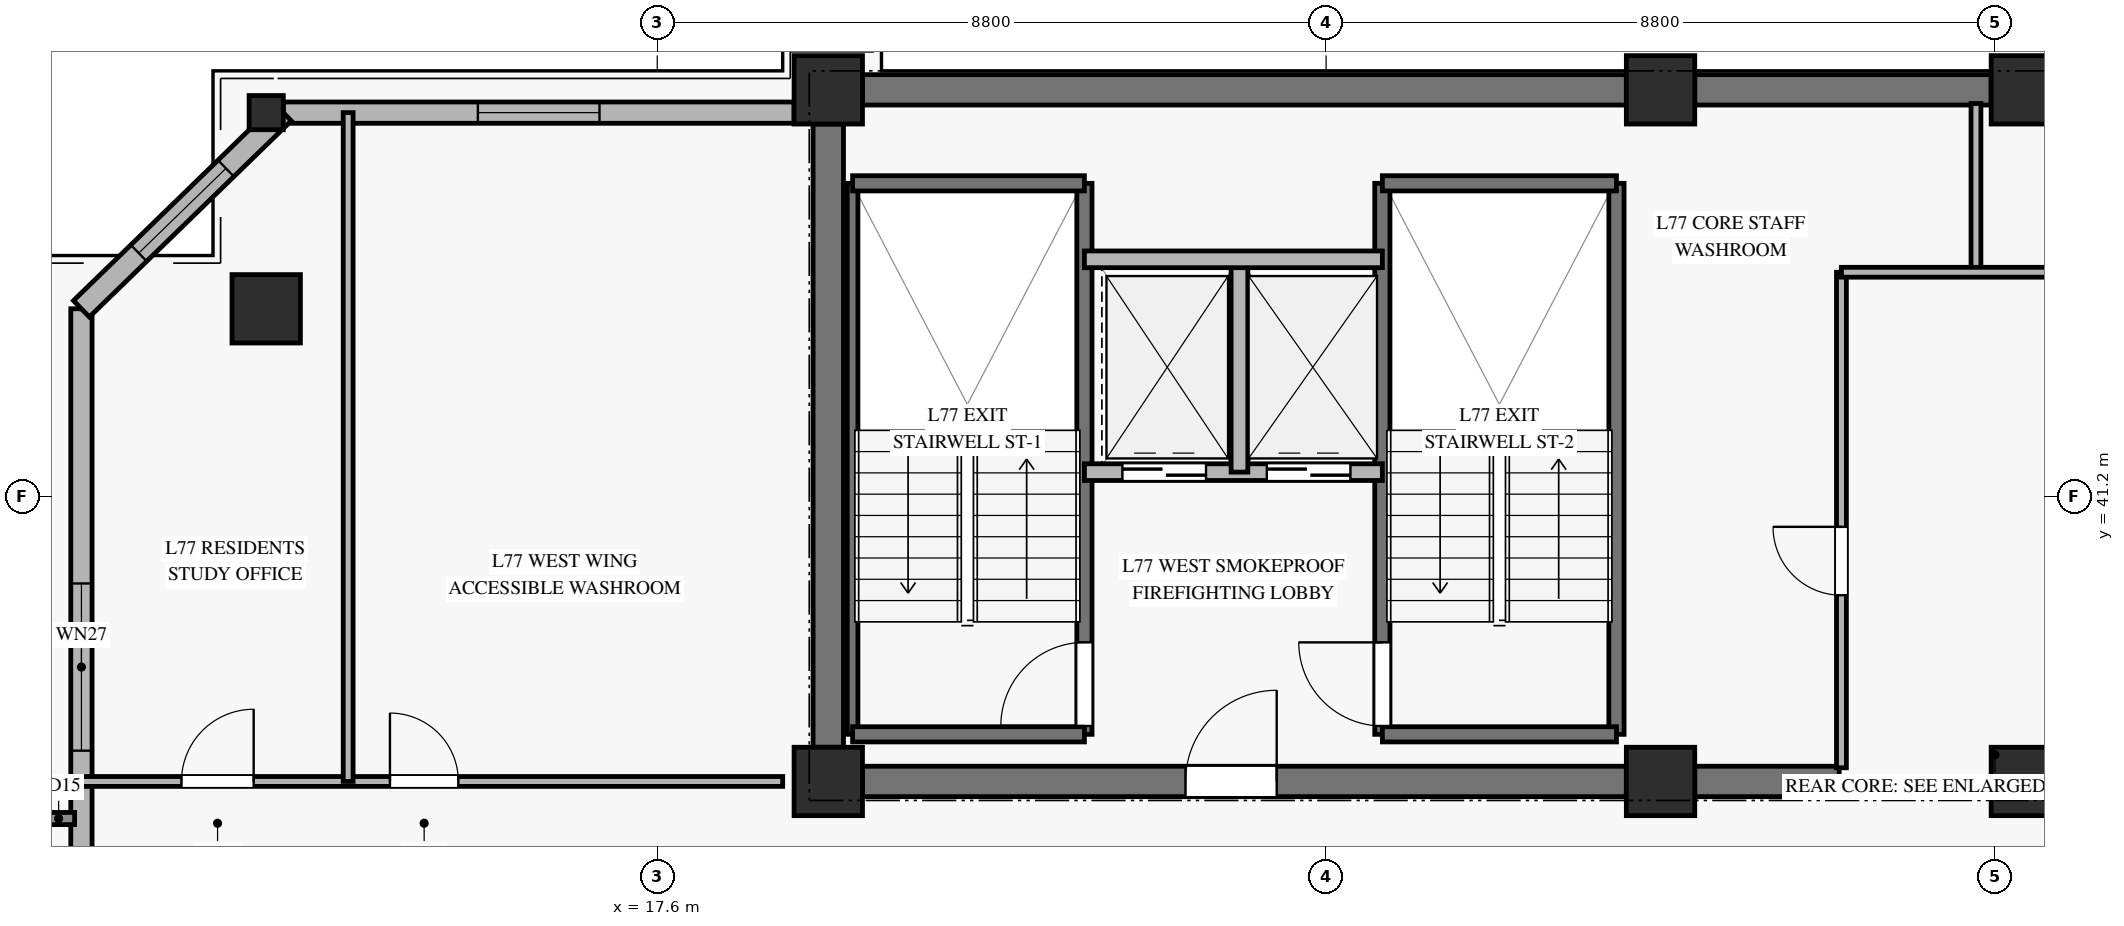
"""IFC4 building model, lengths in metres.
Left out: names, types, materials, properties, quantities, classifications, styles, units other than length and angle.
Written with IfcOpenShell. Run it as: python <this file> out.ifc"""

import sys

from ifc_helpers import new_model, si_unit, direction, frame, frame_2d, origin, origin_2d, place, context, subcontext, project, spatial, rectangle, hollow_rectangle, extrude, source, transform, mapped, element, fill, save


model = new_model("IFC4")
c1 = context("Model", 3, precision=1e-05, world=origin(), true_north=direction((0.0, 1.0)))
c2 = subcontext(c1, "Body", "Model", "MODEL_VIEW")
j1 = project(units=[si_unit("LENGTHUNIT", "METRE"), si_unit("PLANEANGLEUNIT", "RADIAN")], contexts=[c1])
p1 = place(None, origin())
s1 = spatial("IfcSite", under=j1, at=p1, CompositionType="ELEMENT")
p2 = place(p1, origin())
s2 = spatial("IfcBuilding", under=s1, at=p2, CompositionType="ELEMENT")
p3 = place(p2, frame((0.0, 0.0, 300.6)))
s3 = spatial("IfcBuildingStorey", under=s2, at=p3, CompositionType="ELEMENT", Elevation=300.6)
m1 = source(origin(), c2, "Body", "SweptSolid", [
    extrude(rectangle(XDim=0.9, YDim=0.9, at=origin_2d()), origin(), (0.0, 0.0, 1.0), 3.185),
])
for number, where, z_axis, x_axis in (
    (1, (19.85, 37.45, 0.0), (0.0, 0.0, 1.0), (1.0, 0.0, 0.0)),
    (2, (19.85, 46.55, 0.0), (0.0, 0.0, 1.0), (1.0, 0.0, 0.0)),
    (3, (30.8, 37.45, 0.0), (0.0, 0.0, 1.0), (1.0, 0.0, 0.0)),
    (4, (30.8, 46.55, 0.0), (0.0, 0.0, 1.0), (1.0, 0.0, 0.0)),
    (5, (35.6, 37.45, 0.0), (0.0, 0.0, 1.0), (1.0, 0.0, 0.0)),
    (6, (35.6, 46.55, 0.0), (0.0, 0.0, 1.0), (1.0, 0.0, 0.0)),
):
    element("IfcColumn", number, at=place(p3, frame(where, z_axis=z_axis, x_axis=x_axis)), inside=s3, PredefinedType="PILASTER", context=c2, shape_type="MappedRepresentation", body=[
        mapped(m1, transform((0.0, 0.0, 0.0), x_axis=(1.0, 0.0, 0.0), y_axis=(0.0, 1.0, 0.0), z_axis=(0.0, 0.0, 1.0), scale=1.0)),
    ])
p4 = place(p3, frame((20.3, 46.55, 0.0), z_axis=(0.0, 0.0, 1.0), x_axis=(1.0, 0.0, 0.0)))
e7 = element("IfcWall", 7, at=p4, inside=s3, PredefinedType="SHEAR", context=c2, shape_type="SweptSolid", body=[
    extrude(rectangle(XDim=10.05, YDim=0.4, at=frame_2d((5.025, 0.0))), origin(), (0.0, 0.0, 1.0), 3.185),
])
p5 = place(p3, frame((31.25, 46.55, 0.0), z_axis=(0.0, 0.0, 1.0), x_axis=(1.0, 0.0, 0.0)))
e8 = element("IfcWall", 8, at=p5, inside=s3, PredefinedType="SHEAR", context=c2, shape_type="SweptSolid", body=[
    extrude(rectangle(XDim=3.9, YDim=0.4, at=frame_2d((1.95, 0.0))), origin(), (0.0, 0.0, 1.0), 3.185),
])
p6 = place(p3, frame((20.3, 37.45, 0.0), z_axis=(0.0, 0.0, 1.0), x_axis=(1.0, 0.0, 0.0)))
e9 = element("IfcWall", 9, at=p6, inside=s3, PredefinedType="SHEAR", context=c2, shape_type="SweptSolid", body=[
    extrude(rectangle(XDim=10.05, YDim=0.4, at=frame_2d((5.025, 0.0))), origin(), (0.0, 0.0, 1.0), 3.185),
])
p7 = place(p6, frame((4.25, 0.0, 0.0)))
e10 = element("IfcOpeningElement", 10, at=p7, cuts=e9, PredefinedType="OPENING", context=c2, shape_type="SweptSolid", body=[
    extrude(rectangle(XDim=1.2, YDim=2.15, at=frame_2d((0.6, 1.075))), frame((0.0, 0.21, 0.0), z_axis=(0.0, -1.0, 0.0), x_axis=(1.0, 0.0, 0.0)), (0.0, 0.0, 1.0), 0.42),
])
p8 = place(p3, frame((31.25, 37.45, 0.0), z_axis=(0.0, 0.0, 1.0), x_axis=(1.0, 0.0, 0.0)))
e11 = element("IfcWall", 11, at=p8, inside=s3, PredefinedType="SHEAR", context=c2, shape_type="SweptSolid", body=[
    extrude(rectangle(XDim=1.9, YDim=0.4, at=frame_2d((0.95, 0.0))), origin(), (0.0, 0.0, 1.0), 3.185),
])
p9 = place(p3, frame((19.85, 37.9, 0.0), z_axis=(0.0, 0.0, 1.0), x_axis=(0.0, 1.0, 0.0)))
e12 = element("IfcWall", 12, at=p9, inside=s3, PredefinedType="SHEAR", context=c2, shape_type="SweptSolid", body=[
    extrude(rectangle(XDim=8.2, YDim=0.4, at=frame_2d((4.1, 0.0))), origin(), (0.0, 0.0, 1.0), 3.185),
])
m2 = source(origin(), c2, "Body", "SweptSolid", [
    extrude(hollow_rectangle(XDim=0.9, YDim=0.9, WallThickness=0.04, at=origin_2d()), origin(), (0.0, 0.0, 1.0), 3.207),
])
p10 = place(p3, frame((12.455, 43.669, 0.0), z_axis=(0.11534913529, 0.014390090145, 0.993220772182), x_axis=(-0.123792888876, 0.992308077496, 0.0)))
e13 = element("IfcColumn", 13, at=p10, inside=s3, PredefinedType="COLUMN", context=c2, shape_type="MappedRepresentation", body=[
    mapped(m2, transform((0.0, 0.0, 0.0), x_axis=(1.0, 0.0, 0.0), y_axis=(0.0, 1.0, 0.0), z_axis=(0.0, 0.0, 1.0), scale=1.0)),
])
m3 = source(origin(), c2, "Body", "SweptSolid", [
    extrude(hollow_rectangle(XDim=0.45, YDim=0.45, WallThickness=0.022, at=origin_2d()), origin(), (0.0, 0.0, 1.0), 3.206),
])
p11 = place(p3, frame((12.455, 46.25, 0.0), z_axis=(0.115361080088, 0.0, 0.993323623599), x_axis=(0.0, 1.0, 0.0)))
e14 = element("IfcColumn", 14, at=p11, inside=s3, PredefinedType="COLUMN", context=c2, shape_type="MappedRepresentation", body=[
    mapped(m3, transform((0.0, 0.0, 0.0), x_axis=(1.0, 0.0, 0.0), y_axis=(0.0, 1.0, 0.0), z_axis=(0.0, 0.0, 1.0), scale=1.0)),
])
p12 = place(p3, frame((10.024, 32.696, 0.0), z_axis=(0.0, 0.0, 1.0), x_axis=(0.0, 1.0, 0.0)))
e15 = element("IfcWall", 15, at=p12, inside=s3, PredefinedType="SOLIDWALL", context=c2, shape_type="SweptSolid", body=[
    extrude(rectangle(XDim=10.973, YDim=0.28, at=frame_2d((5.486, 0.0))), origin(), (0.0, 0.0, 1.0), 2.815),
])
p13 = place(p12, frame((5.159, 0.0, 0.45)))
e16 = element("IfcOpeningElement", 16, at=p13, cuts=e15, PredefinedType="OPENING", context=c2, shape_type="SweptSolid", body=[
    extrude(rectangle(XDim=2.2, YDim=2.1, at=frame_2d((1.1, 1.05))), frame((0.0, 0.15, 0.0), z_axis=(0.0, -1.0, 0.0), x_axis=(1.0, 0.0, 0.0)), (0.0, 0.0, 1.0), 0.3),
])
p14 = place(p3, frame((12.68, 46.25, 0.0), z_axis=(0.0, 0.0, 1.0), x_axis=(1.0, 0.0, 0.0)))
e17 = element("IfcWall", 17, at=p14, inside=s3, PredefinedType="SOLIDWALL", context=c2, shape_type="SweptSolid", body=[
    extrude(rectangle(XDim=6.72, YDim=0.28, at=frame_2d((3.36, 0.0))), origin(), (0.0, 0.0, 1.0), 2.815),
])
p15 = place(p14, frame((2.56, 0.0, 0.45)))
e18 = element("IfcOpeningElement", 18, at=p15, cuts=e17, PredefinedType="OPENING", context=c2, shape_type="SweptSolid", body=[
    extrude(rectangle(XDim=1.6, YDim=2.0, at=frame_2d((0.8, 1.0))), frame((0.0, 0.15, 0.0), z_axis=(0.0, -1.0, 0.0), x_axis=(1.0, 0.0, 0.0)), (0.0, 0.0, 1.0), 0.3),
])
p16 = place(p3, frame((12.68, 46.25, 0.0), z_axis=(0.0, 0.0, 1.0), x_axis=(-0.717153230711, -0.696915521194, 0.0)))
e19 = element("IfcWall", 19, at=p16, inside=s3, PredefinedType="SOLIDWALL", context=c2, shape_type="SweptSolid", body=[
    extrude(rectangle(XDim=3.704, YDim=0.3, at=frame_2d((1.852, 0.0))), origin(), (0.0, 0.0, 1.0), 2.815),
])
p17 = place(p16, frame((1.052, 0.0, 0.45)))
e20 = element("IfcOpeningElement", 20, at=p17, cuts=e19, PredefinedType="OPENING", context=c2, shape_type="SweptSolid", body=[
    extrude(rectangle(XDim=1.6, YDim=2.0, at=frame_2d((0.8, 1.0))), frame((0.0, 0.16, 0.0), z_axis=(0.0, -1.0, 0.0), x_axis=(1.0, 0.0, 0.0)), (0.0, 0.0, 1.0), 0.32),
])
p18 = place(p3, frame((20.17, 38.07, 0.0), z_axis=(0.0, 0.0, 1.0), x_axis=(0.0, 1.0, 0.0)))
e21 = element("IfcWall", 21, at=p18, inside=s3, PredefinedType="SOLIDWALL", context=c2, shape_type="SweptSolid", body=[
    extrude(rectangle(XDim=7.25, YDim=0.14, at=frame_2d((3.625, 0.0))), origin(), (0.0, 0.0, 1.0), 3.4),
])
p19 = place(p3, frame((23.22, 38.07, 0.0), z_axis=(0.0, 0.0, 1.0), x_axis=(0.0, 1.0, 0.0)))
e22 = element("IfcWall", 22, at=p19, inside=s3, PredefinedType="SOLIDWALL", context=c2, shape_type="SweptSolid", body=[
    extrude(rectangle(XDim=7.25, YDim=0.2, at=frame_2d((3.625, 0.0))), origin(), (0.0, 0.0, 1.0), 3.4),
])
p20 = place(p19, frame((0.11, 0.0, 0.0)))
e23 = element("IfcOpeningElement", 23, at=p20, cuts=e22, PredefinedType="OPENING", context=c2, shape_type="SweptSolid", body=[
    extrude(rectangle(XDim=1.1, YDim=2.15, at=frame_2d((0.55, 1.075))), frame((0.0, 0.11, 0.0), z_axis=(0.0, -1.0, 0.0), x_axis=(1.0, 0.0, 0.0)), (0.0, 0.0, 1.0), 0.22),
])
for number, where, z_axis, x_axis in (
    (24, (20.17, 45.32, 0.0), (0.0, 0.0, 1.0), (1.0, 0.0, 0.0)),
    (25, (20.17, 38.07, 0.0), (0.0, 0.0, 1.0), (1.0, 0.0, 0.0)),
):
    element("IfcWall", number, at=place(p3, frame(where, z_axis=z_axis, x_axis=x_axis)), inside=s3, PredefinedType="SOLIDWALL", context=c2, shape_type="SweptSolid", body=[
        extrude(rectangle(XDim=3.05, YDim=0.2, at=frame_2d((1.525, 0.0))), origin(), (0.0, 0.0, 1.0), 3.4),
    ])
p21 = place(p3, frame((27.14, 38.07, 0.0), z_axis=(0.0, 0.0, 1.0), x_axis=(0.0, 1.0, 0.0)))
e26 = element("IfcWall", 26, at=p21, inside=s3, PredefinedType="SOLIDWALL", context=c2, shape_type="SweptSolid", body=[
    extrude(rectangle(XDim=7.25, YDim=0.2, at=frame_2d((3.625, 0.0))), origin(), (0.0, 0.0, 1.0), 3.4),
])
p22 = place(p21, frame((0.11, 0.0, 0.0)))
e27 = element("IfcOpeningElement", 27, at=p22, cuts=e26, PredefinedType="OPENING", context=c2, shape_type="SweptSolid", body=[
    extrude(rectangle(XDim=1.1, YDim=2.15, at=frame_2d((0.55, 1.075))), frame((0.0, 0.11, 0.0), z_axis=(0.0, -1.0, 0.0), x_axis=(1.0, 0.0, 0.0)), (0.0, 0.0, 1.0), 0.22),
])
p23 = place(p3, frame((30.22, 38.07, 0.0), z_axis=(0.0, 0.0, 1.0), x_axis=(0.0, 1.0, 0.0)))
e28 = element("IfcWall", 28, at=p23, inside=s3, PredefinedType="SOLIDWALL", context=c2, shape_type="SweptSolid", body=[
    extrude(rectangle(XDim=7.25, YDim=0.2, at=frame_2d((3.625, 0.0))), origin(), (0.0, 0.0, 1.0), 3.4),
])
for number, where, z_axis, x_axis in (
    (29, (27.14, 45.32, 0.0), (0.0, 0.0, 1.0), (1.0, 0.0, 0.0)),
    (30, (27.14, 38.07, 0.0), (0.0, 0.0, 1.0), (1.0, 0.0, 0.0)),
):
    element("IfcWall", number, at=place(p3, frame(where, z_axis=z_axis, x_axis=x_axis)), inside=s3, PredefinedType="SOLIDWALL", context=c2, shape_type="SweptSolid", body=[
        extrude(rectangle(XDim=3.08, YDim=0.2, at=frame_2d((1.54, 0.0))), origin(), (0.0, 0.0, 1.0), 3.4),
    ])
p24 = place(p3, frame((23.22, 41.52, 0.0), z_axis=(0.0, 0.0, 1.0), x_axis=(1.0, 0.0, 0.0)))
e31 = element("IfcWall", 31, at=p24, inside=s3, PredefinedType="SOLIDWALL", context=c2, shape_type="SweptSolid", body=[
    extrude(rectangle(XDim=3.92, YDim=0.22, at=frame_2d((1.96, 0.0))), origin(), (0.0, 0.0, 1.0), 3.185),
])
p25 = place(p24, frame((0.5, 0.0, 0.0)))
e32 = element("IfcOpeningElement", 32, at=p25, cuts=e31, PredefinedType="OPENING", context=c2, shape_type="SweptSolid", body=[
    extrude(rectangle(XDim=1.1, YDim=2.2, at=frame_2d((0.55, 1.1))), frame((0.0, 0.12, 0.0), z_axis=(0.0, -1.0, 0.0), x_axis=(1.0, 0.0, 0.0)), (0.0, 0.0, 1.0), 0.24),
])
p26 = place(p24, frame((2.4, 0.0, 0.0)))
e33 = element("IfcOpeningElement", 33, at=p26, cuts=e31, PredefinedType="OPENING", context=c2, shape_type="SweptSolid", body=[
    extrude(rectangle(XDim=1.1, YDim=2.2, at=frame_2d((0.55, 1.1))), frame((0.0, 0.12, 0.0), z_axis=(0.0, -1.0, 0.0), x_axis=(1.0, 0.0, 0.0)), (0.0, 0.0, 1.0), 0.24),
])
p27 = place(p3, frame((25.26, 41.52, 0.0), z_axis=(0.0, 0.0, 1.0), x_axis=(0.0, 1.0, 0.0)))
e34 = element("IfcWall", 34, at=p27, inside=s3, PredefinedType="SOLIDWALL", context=c2, shape_type="SweptSolid", body=[
    extrude(rectangle(XDim=2.8, YDim=0.22, at=frame_2d((1.4, 0.0))), origin(), (0.0, 0.0, 1.0), 3.185),
])
p28 = place(p3, frame((23.22, 44.32, 0.0), z_axis=(0.0, 0.0, 1.0), x_axis=(1.0, 0.0, 0.0)))
e35 = element("IfcWall", 35, at=p28, inside=s3, PredefinedType="SOLIDWALL", context=c2, shape_type="SweptSolid", body=[
    extrude(rectangle(XDim=3.92, YDim=0.22, at=frame_2d((1.96, 0.0))), origin(), (0.0, 0.0, 1.0), 3.185),
])
p29 = place(p3, frame((33.18, 37.63, 0.0), z_axis=(0.0, 0.0, 1.0), x_axis=(0.0, 1.0, 0.0)))
e36 = element("IfcWall", 36, at=p29, inside=s3, PredefinedType="PARTITIONING", context=c2, shape_type="SweptSolid", body=[
    extrude(rectangle(XDim=6.52, YDim=0.13, at=frame_2d((3.26, 0.0))), origin(), (0.0, 0.0, 1.0), 2.27),
])
p30 = place(p29, frame((2.27, 0.0, 0.0)))
e37 = element("IfcOpeningElement", 37, at=p30, cuts=e36, PredefinedType="OPENING", context=c2, shape_type="SweptSolid", body=[
    extrude(rectangle(XDim=0.9, YDim=2.1, at=frame_2d((0.45, 1.05))), frame((0.0, 0.075, 0.0), z_axis=(0.0, -1.0, 0.0), x_axis=(1.0, 0.0, 0.0)), (0.0, 0.0, 1.0), 0.15),
])
p31 = place(p3, frame((34.95, 44.15, 0.0), z_axis=(0.0, 0.0, 1.0), x_axis=(0.0, 1.0, 0.0)))
e38 = element("IfcWall", 38, at=p31, inside=s3, PredefinedType="PARTITIONING", context=c2, shape_type="SweptSolid", body=[
    extrude(rectangle(XDim=2.22, YDim=0.13, at=frame_2d((1.11, 0.0))), origin(), (0.0, 0.0, 1.0), 3.185),
])
p32 = place(p3, frame((33.18, 44.15, 0.0), z_axis=(0.0, 0.0, 1.0), x_axis=(1.0, 0.0, 0.0)))
e39 = element("IfcWall", 39, at=p32, inside=s3, PredefinedType="PARTITIONING", context=c2, shape_type="SweptSolid", body=[
    extrude(rectangle(XDim=2.94, YDim=0.13, at=frame_2d((1.47, 0.0))), origin(), (0.0, 0.0, 1.0), 2.47),
])
p33 = place(p3, frame((10.024, 37.45, 0.0), z_axis=(0.0, 0.0, 1.0), x_axis=(1.0, 0.0, 0.0)))
e40 = element("IfcWall", 40, at=p33, inside=s3, PredefinedType="PARTITIONING", context=c2, shape_type="SweptSolid", body=[
    extrude(rectangle(XDim=9.226, YDim=0.13, at=frame_2d((4.613, 0.0))), origin(), (0.0, 0.0, 1.0), 2.82),
])
p34 = place(p33, frame((1.316, 0.0, 0.0)))
e41 = element("IfcOpeningElement", 41, at=p34, cuts=e40, PredefinedType="OPENING", context=c2, shape_type="SweptSolid", body=[
    extrude(rectangle(XDim=0.95, YDim=2.1, at=frame_2d((0.475, 1.05))), frame((0.0, 0.075, 0.0), z_axis=(0.0, -1.0, 0.0), x_axis=(1.0, 0.0, 0.0)), (0.0, 0.0, 1.0), 0.15),
])
p35 = place(p33, frame((4.059, 0.0, 0.0)))
e42 = element("IfcOpeningElement", 42, at=p35, cuts=e40, PredefinedType="OPENING", context=c2, shape_type="SweptSolid", body=[
    extrude(rectangle(XDim=0.9, YDim=2.1, at=frame_2d((0.45, 1.05))), frame((0.0, 0.075, 0.0), z_axis=(0.0, -1.0, 0.0), x_axis=(1.0, 0.0, 0.0)), (0.0, 0.0, 1.0), 0.15),
])
p36 = place(p3, frame((13.533, 37.45, 0.0), z_axis=(0.0, 0.0, 1.0), x_axis=(0.0, 1.0, 0.0)))
e43 = element("IfcWall", 43, at=p36, inside=s3, PredefinedType="PARTITIONING", context=c2, shape_type="SweptSolid", body=[
    extrude(rectangle(XDim=8.8, YDim=0.13, at=frame_2d((4.4, 0.0))), origin(), (0.0, 0.0, 1.0), 3.185),
])
m4 = source(origin(), c2, "Body", "SweptSolid", [
    extrude(rectangle(XDim=2.2, YDim=2.1, at=frame_2d((1.1, 1.05))), frame((0.0, 0.03, 0.0), z_axis=(0.0, -1.0, 0.0), x_axis=(1.0, 0.0, 0.0)), (0.0, 0.0, 1.0), 0.06),
])
p37 = place(p13, origin())
e44 = element("IfcWindow", 44, at=p37, inside=s3, PartitioningType="SINGLE_PANEL", PredefinedType="WINDOW", context=c2, shape_type="MappedRepresentation", body=[
    mapped(m4, transform((0.0, 0.0, 0.0), x_axis=(1.0, 0.0, 0.0), y_axis=(0.0, 1.0, 0.0), z_axis=(0.0, 0.0, 1.0), scale=1.0)),
])
fill(e16, e44)
m5 = source(origin(), c2, "Body", "SweptSolid", [
    extrude(rectangle(XDim=1.6, YDim=2.0, at=frame_2d((0.8, 1.0))), frame((0.0, 0.03, 0.0), z_axis=(0.0, -1.0, 0.0), x_axis=(1.0, 0.0, 0.0)), (0.0, 0.0, 1.0), 0.06),
])
p38 = place(p15, origin())
e45 = element("IfcWindow", 45, at=p38, inside=s3, PartitioningType="SINGLE_PANEL", PredefinedType="WINDOW", context=c2, shape_type="MappedRepresentation", body=[
    mapped(m5, transform((0.0, 0.0, 0.0), x_axis=(1.0, 0.0, 0.0), y_axis=(0.0, 1.0, 0.0), z_axis=(0.0, 0.0, 1.0), scale=1.0)),
])
fill(e18, e45)
p39 = place(p17, origin())
e46 = element("IfcWindow", 46, at=p39, inside=s3, PartitioningType="SINGLE_PANEL", PredefinedType="WINDOW", context=c2, shape_type="MappedRepresentation", body=[
    mapped(m5, transform((0.0, 0.0, 0.0), x_axis=(1.0, 0.0, 0.0), y_axis=(0.0, 1.0, 0.0), z_axis=(0.0, 0.0, 1.0), scale=1.0)),
])
fill(e20, e46)
m6 = source(origin(), c2, "Body", "SweptSolid", [
    extrude(rectangle(XDim=1.1, YDim=2.15, at=frame_2d((0.55, 1.075))), frame((0.0, 0.025, 0.0), z_axis=(0.0, -1.0, 0.0), x_axis=(1.0, 0.0, 0.0)), (0.0, 0.0, 1.0), 0.05),
])
p40 = place(p20, origin())
e47 = element("IfcDoor", 47, at=p40, inside=s3, OperationType="SINGLE_SWING_LEFT", PredefinedType="DOOR", context=c2, shape_type="MappedRepresentation", body=[
    mapped(m6, transform((0.0, 0.0, 0.0), x_axis=(1.0, 0.0, 0.0), y_axis=(0.0, 1.0, 0.0), z_axis=(0.0, 0.0, 1.0), scale=1.0)),
])
fill(e23, e47)
p41 = place(p22, origin())
e48 = element("IfcDoor", 48, at=p41, inside=s3, OperationType="SINGLE_SWING_RIGHT", PredefinedType="DOOR", context=c2, shape_type="MappedRepresentation", body=[
    mapped(m6, transform((0.0, 0.0, 0.0), x_axis=(1.0, 0.0, 0.0), y_axis=(0.0, 1.0, 0.0), z_axis=(0.0, 0.0, 1.0), scale=1.0)),
])
fill(e27, e48)
m7 = source(origin(), c2, "Body", "SweptSolid", [
    extrude(rectangle(XDim=1.1, YDim=2.2, at=frame_2d((0.55, 1.1))), frame((0.0, 0.025, 0.0), z_axis=(0.0, -1.0, 0.0), x_axis=(1.0, 0.0, 0.0)), (0.0, 0.0, 1.0), 0.05),
])
p42 = place(p25, origin())
e49 = element("IfcDoor", 49, at=p42, inside=s3, OperationType="SLIDING_TO_LEFT", PredefinedType="DOOR", context=c2, shape_type="MappedRepresentation", body=[
    mapped(m7, transform((0.0, 0.0, 0.0), x_axis=(1.0, 0.0, 0.0), y_axis=(0.0, 1.0, 0.0), z_axis=(0.0, 0.0, 1.0), scale=1.0)),
])
fill(e32, e49)
p43 = place(p26, origin())
e50 = element("IfcDoor", 50, at=p43, inside=s3, OperationType="SLIDING_TO_LEFT", PredefinedType="DOOR", context=c2, shape_type="MappedRepresentation", body=[
    mapped(m7, transform((0.0, 0.0, 0.0), x_axis=(1.0, 0.0, 0.0), y_axis=(0.0, 1.0, 0.0), z_axis=(0.0, 0.0, 1.0), scale=1.0)),
])
fill(e33, e50)
m8 = source(origin(), c2, "Body", "SweptSolid", [
    extrude(rectangle(XDim=1.2, YDim=2.15, at=frame_2d((0.6, 1.075))), frame((0.0, 0.025, 0.0), z_axis=(0.0, -1.0, 0.0), x_axis=(1.0, 0.0, 0.0)), (0.0, 0.0, 1.0), 0.05),
])
p44 = place(p7, origin())
e51 = element("IfcDoor", 51, at=p44, inside=s3, OperationType="SINGLE_SWING_RIGHT", PredefinedType="DOOR", context=c2, shape_type="MappedRepresentation", body=[
    mapped(m8, transform((0.0, 0.0, 0.0), x_axis=(1.0, 0.0, 0.0), y_axis=(0.0, 1.0, 0.0), z_axis=(0.0, 0.0, 1.0), scale=1.0)),
])
fill(e10, e51)
m9 = source(origin(), c2, "Body", "SweptSolid", [
    extrude(rectangle(XDim=0.9, YDim=2.1, at=frame_2d((0.45, 1.05))), frame((0.0, 0.025, 0.0), z_axis=(0.0, -1.0, 0.0), x_axis=(1.0, 0.0, 0.0)), (0.0, 0.0, 1.0), 0.05),
])
p45 = place(p30, origin())
e52 = element("IfcDoor", 52, at=p45, inside=s3, OperationType="SINGLE_SWING_RIGHT", PredefinedType="DOOR", context=c2, shape_type="MappedRepresentation", body=[
    mapped(m9, transform((0.0, 0.0, 0.0), x_axis=(1.0, 0.0, 0.0), y_axis=(0.0, 1.0, 0.0), z_axis=(0.0, 0.0, 1.0), scale=1.0)),
])
fill(e37, e52)
m10 = source(origin(), c2, "Body", "SweptSolid", [
    extrude(rectangle(XDim=0.95, YDim=2.1, at=frame_2d((0.475, 1.05))), frame((0.0, 0.025, 0.0), z_axis=(0.0, -1.0, 0.0), x_axis=(1.0, 0.0, 0.0)), (0.0, 0.0, 1.0), 0.05),
])
p46 = place(p34, origin())
e53 = element("IfcDoor", 53, at=p46, inside=s3, OperationType="SINGLE_SWING_RIGHT", PredefinedType="DOOR", context=c2, shape_type="MappedRepresentation", body=[
    mapped(m10, transform((0.0, 0.0, 0.0), x_axis=(1.0, 0.0, 0.0), y_axis=(0.0, 1.0, 0.0), z_axis=(0.0, 0.0, 1.0), scale=1.0)),
])
fill(e41, e53)
p47 = place(p35, origin())
e54 = element("IfcDoor", 54, at=p47, inside=s3, OperationType="SINGLE_SWING_LEFT", PredefinedType="DOOR", context=c2, shape_type="MappedRepresentation", body=[
    mapped(m9, transform((0.0, 0.0, 0.0), x_axis=(1.0, 0.0, 0.0), y_axis=(0.0, 1.0, 0.0), z_axis=(0.0, 0.0, 1.0), scale=1.0)),
])
fill(e42, e54)
save(model, sys.argv[1])
